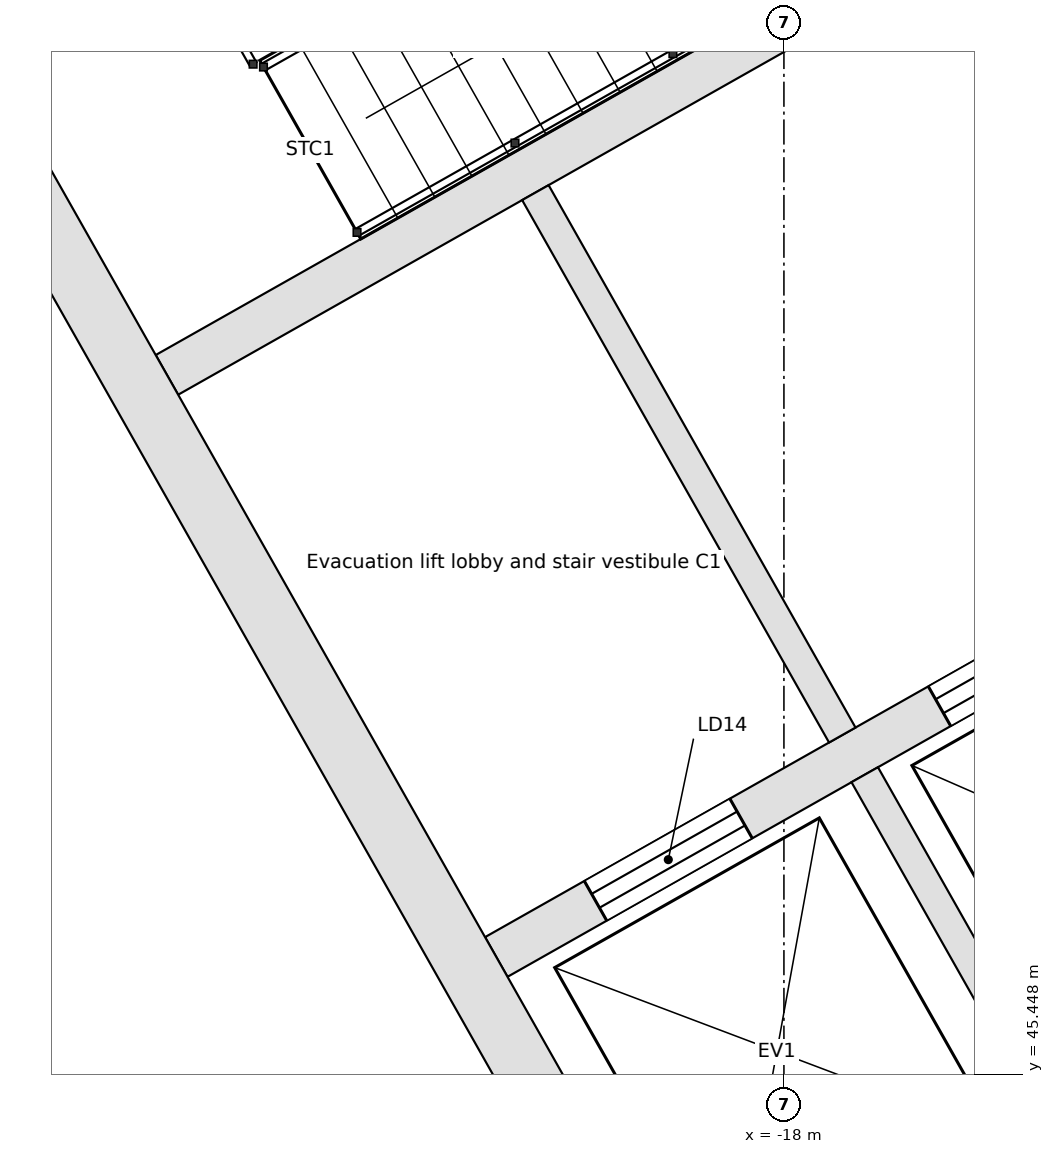
"""IFC4 building model, lengths in metres.
Left out: names, types, materials, properties, quantities, classifications, styles, units other than length and angle.
Written with IfcOpenShell. Run it as: python <this file> out.ifc"""

import sys

from ifc_helpers import new_model, si_unit, direction, frame, frame_2d, origin, place, context, subcontext, project, spatial, rectangle, extrude, element, fill, save


model = new_model("IFC4")
c1 = context("Model", 3, precision=1e-05, world=origin(), true_north=direction((0.0, 1.0)))
c2 = subcontext(c1, "Body", "Model", "MODEL_VIEW")
j1 = project(units=[si_unit("LENGTHUNIT", "METRE"), si_unit("PLANEANGLEUNIT", "RADIAN")], contexts=[c1])
p1 = place(None, origin())
s1 = spatial("IfcSite", under=j1, at=p1, CompositionType="ELEMENT")
p2 = place(p1, origin())
s2 = spatial("IfcBuilding", under=s1, at=p2, CompositionType="ELEMENT")
p3 = place(p2, frame((0.0, 0.0, 277.9)))
s3 = spatial("IfcBuildingStorey", under=s2, at=p3, CompositionType="ELEMENT", Elevation=277.9)
p4 = place(p3, frame((-58.732, 38.771, 0.0), z_axis=(0.0, 0.0, 1.0), x_axis=(0.870355615581, 0.492423702137, 0.0)))
e1 = element("IfcWall", 1, at=p4, inside=s3, PredefinedType="STANDARD", context=c2, shape_type="SweptSolid", body=[
    extrude(rectangle(XDim=64.052, YDim=0.25, at=frame_2d((32.026, 0.0))), origin(), (0.0, 0.0, 1.0), 3.52),
])
p5 = place(p4, frame((61.259, 0.0, 0.8)))
e2 = element("IfcOpeningElement", 2, at=p5, cuts=e1, PredefinedType="OPENING", context=c2, shape_type="SweptSolid", body=[
    extrude(rectangle(XDim=2.4, YDim=2.2, at=frame_2d((1.2, 1.1))), frame((0.0, 0.135, 0.0), z_axis=(0.0, -1.0, 0.0), x_axis=(1.0, 0.0, 0.0)), (0.0, 0.0, 1.0), 0.27),
])
p6 = place(p4, frame((58.216, 0.0, 0.8)))
e3 = element("IfcOpeningElement", 3, at=p6, cuts=e1, PredefinedType="OPENING", context=c2, shape_type="SweptSolid", body=[
    extrude(rectangle(XDim=2.4, YDim=2.2, at=frame_2d((1.2, 1.1))), frame((0.0, 0.135, 0.0), z_axis=(0.0, -1.0, 0.0), x_axis=(1.0, 0.0, 0.0)), (0.0, 0.0, 1.0), 0.27),
])
p7 = place(p4, frame((55.173, 0.0, 0.8)))
e4 = element("IfcOpeningElement", 4, at=p7, cuts=e1, PredefinedType="OPENING", context=c2, shape_type="SweptSolid", body=[
    extrude(rectangle(XDim=2.4, YDim=2.2, at=frame_2d((1.2, 1.1))), frame((0.0, 0.135, 0.0), z_axis=(0.0, -1.0, 0.0), x_axis=(1.0, 0.0, 0.0)), (0.0, 0.0, 1.0), 0.27),
])
p8 = place(p4, frame((52.129, 0.0, 0.8)))
e5 = element("IfcOpeningElement", 5, at=p8, cuts=e1, PredefinedType="OPENING", context=c2, shape_type="SweptSolid", body=[
    extrude(rectangle(XDim=2.4, YDim=2.2, at=frame_2d((1.2, 1.1))), frame((0.0, 0.135, 0.0), z_axis=(0.0, -1.0, 0.0), x_axis=(1.0, 0.0, 0.0)), (0.0, 0.0, 1.0), 0.27),
])
p9 = place(p4, frame((49.086, 0.0, 0.8)))
e6 = element("IfcOpeningElement", 6, at=p9, cuts=e1, PredefinedType="OPENING", context=c2, shape_type="SweptSolid", body=[
    extrude(rectangle(XDim=2.4, YDim=2.2, at=frame_2d((1.2, 1.1))), frame((0.0, 0.135, 0.0), z_axis=(0.0, -1.0, 0.0), x_axis=(1.0, 0.0, 0.0)), (0.0, 0.0, 1.0), 0.27),
])
p10 = place(p4, frame((46.043, 0.0, 0.8)))
e7 = element("IfcOpeningElement", 7, at=p10, cuts=e1, PredefinedType="OPENING", context=c2, shape_type="SweptSolid", body=[
    extrude(rectangle(XDim=2.4, YDim=2.2, at=frame_2d((1.2, 1.1))), frame((0.0, 0.135, 0.0), z_axis=(0.0, -1.0, 0.0), x_axis=(1.0, 0.0, 0.0)), (0.0, 0.0, 1.0), 0.27),
])
p11 = place(p4, frame((43.0, 0.0, 0.8)))
e8 = element("IfcOpeningElement", 8, at=p11, cuts=e1, PredefinedType="OPENING", context=c2, shape_type="SweptSolid", body=[
    extrude(rectangle(XDim=2.4, YDim=2.2, at=frame_2d((1.2, 1.1))), frame((0.0, 0.135, 0.0), z_axis=(0.0, -1.0, 0.0), x_axis=(1.0, 0.0, 0.0)), (0.0, 0.0, 1.0), 0.27),
])
p12 = place(p4, frame((39.956, 0.0, 0.8)))
e9 = element("IfcOpeningElement", 9, at=p12, cuts=e1, PredefinedType="OPENING", context=c2, shape_type="SweptSolid", body=[
    extrude(rectangle(XDim=2.4, YDim=2.2, at=frame_2d((1.2, 1.1))), frame((0.0, 0.135, 0.0), z_axis=(0.0, -1.0, 0.0), x_axis=(1.0, 0.0, 0.0)), (0.0, 0.0, 1.0), 0.27),
])
p13 = place(p4, frame((36.913, 0.0, 0.8)))
e10 = element("IfcOpeningElement", 10, at=p13, cuts=e1, PredefinedType="OPENING", context=c2, shape_type="SweptSolid", body=[
    extrude(rectangle(XDim=2.4, YDim=2.2, at=frame_2d((1.2, 1.1))), frame((0.0, 0.135, 0.0), z_axis=(0.0, -1.0, 0.0), x_axis=(1.0, 0.0, 0.0)), (0.0, 0.0, 1.0), 0.27),
])
p14 = place(p4, frame((33.87, 0.0, 0.8)))
e11 = element("IfcOpeningElement", 11, at=p14, cuts=e1, PredefinedType="OPENING", context=c2, shape_type="SweptSolid", body=[
    extrude(rectangle(XDim=2.4, YDim=2.2, at=frame_2d((1.2, 1.1))), frame((0.0, 0.135, 0.0), z_axis=(0.0, -1.0, 0.0), x_axis=(1.0, 0.0, 0.0)), (0.0, 0.0, 1.0), 0.27),
])
p15 = place(p4, frame((30.826, 0.0, 0.8)))
e12 = element("IfcOpeningElement", 12, at=p15, cuts=e1, PredefinedType="OPENING", context=c2, shape_type="SweptSolid", body=[
    extrude(rectangle(XDim=2.4, YDim=2.2, at=frame_2d((1.2, 1.1))), frame((0.0, 0.135, 0.0), z_axis=(0.0, -1.0, 0.0), x_axis=(1.0, 0.0, 0.0)), (0.0, 0.0, 1.0), 0.27),
])
p16 = place(p4, frame((27.783, 0.0, 0.8)))
e13 = element("IfcOpeningElement", 13, at=p16, cuts=e1, PredefinedType="OPENING", context=c2, shape_type="SweptSolid", body=[
    extrude(rectangle(XDim=2.4, YDim=2.2, at=frame_2d((1.2, 1.1))), frame((0.0, 0.135, 0.0), z_axis=(0.0, -1.0, 0.0), x_axis=(1.0, 0.0, 0.0)), (0.0, 0.0, 1.0), 0.27),
])
p17 = place(p4, frame((24.74, 0.0, 0.8)))
e14 = element("IfcOpeningElement", 14, at=p17, cuts=e1, PredefinedType="OPENING", context=c2, shape_type="SweptSolid", body=[
    extrude(rectangle(XDim=2.4, YDim=2.2, at=frame_2d((1.2, 1.1))), frame((0.0, 0.135, 0.0), z_axis=(0.0, -1.0, 0.0), x_axis=(1.0, 0.0, 0.0)), (0.0, 0.0, 1.0), 0.27),
])
p18 = place(p4, frame((21.696, 0.0, 0.8)))
e15 = element("IfcOpeningElement", 15, at=p18, cuts=e1, PredefinedType="OPENING", context=c2, shape_type="SweptSolid", body=[
    extrude(rectangle(XDim=2.4, YDim=2.2, at=frame_2d((1.2, 1.1))), frame((0.0, 0.135, 0.0), z_axis=(0.0, -1.0, 0.0), x_axis=(1.0, 0.0, 0.0)), (0.0, 0.0, 1.0), 0.27),
])
p19 = place(p4, frame((18.653, 0.0, 0.8)))
e16 = element("IfcOpeningElement", 16, at=p19, cuts=e1, PredefinedType="OPENING", context=c2, shape_type="SweptSolid", body=[
    extrude(rectangle(XDim=2.4, YDim=2.2, at=frame_2d((1.2, 1.1))), frame((0.0, 0.135, 0.0), z_axis=(0.0, -1.0, 0.0), x_axis=(1.0, 0.0, 0.0)), (0.0, 0.0, 1.0), 0.27),
])
p20 = place(p4, frame((15.61, 0.0, 0.8)))
e17 = element("IfcOpeningElement", 17, at=p20, cuts=e1, PredefinedType="OPENING", context=c2, shape_type="SweptSolid", body=[
    extrude(rectangle(XDim=2.4, YDim=2.2, at=frame_2d((1.2, 1.1))), frame((0.0, 0.135, 0.0), z_axis=(0.0, -1.0, 0.0), x_axis=(1.0, 0.0, 0.0)), (0.0, 0.0, 1.0), 0.27),
])
p21 = place(p4, frame((12.567, 0.0, 0.8)))
e18 = element("IfcOpeningElement", 18, at=p21, cuts=e1, PredefinedType="OPENING", context=c2, shape_type="SweptSolid", body=[
    extrude(rectangle(XDim=2.4, YDim=2.2, at=frame_2d((1.2, 1.1))), frame((0.0, 0.135, 0.0), z_axis=(0.0, -1.0, 0.0), x_axis=(1.0, 0.0, 0.0)), (0.0, 0.0, 1.0), 0.27),
])
p22 = place(p4, frame((9.523, 0.0, 0.8)))
e19 = element("IfcOpeningElement", 19, at=p22, cuts=e1, PredefinedType="OPENING", context=c2, shape_type="SweptSolid", body=[
    extrude(rectangle(XDim=2.4, YDim=2.2, at=frame_2d((1.2, 1.1))), frame((0.0, 0.135, 0.0), z_axis=(0.0, -1.0, 0.0), x_axis=(1.0, 0.0, 0.0)), (0.0, 0.0, 1.0), 0.27),
])
p23 = place(p4, frame((6.48, 0.0, 0.8)))
e20 = element("IfcOpeningElement", 20, at=p23, cuts=e1, PredefinedType="OPENING", context=c2, shape_type="SweptSolid", body=[
    extrude(rectangle(XDim=2.4, YDim=2.2, at=frame_2d((1.2, 1.1))), frame((0.0, 0.135, 0.0), z_axis=(0.0, -1.0, 0.0), x_axis=(1.0, 0.0, 0.0)), (0.0, 0.0, 1.0), 0.27),
])
p24 = place(p4, frame((3.437, 0.0, 0.8)))
e21 = element("IfcOpeningElement", 21, at=p24, cuts=e1, PredefinedType="OPENING", context=c2, shape_type="SweptSolid", body=[
    extrude(rectangle(XDim=2.4, YDim=2.2, at=frame_2d((1.2, 1.1))), frame((0.0, 0.135, 0.0), z_axis=(0.0, -1.0, 0.0), x_axis=(1.0, 0.0, 0.0)), (0.0, 0.0, 1.0), 0.27),
])
p25 = place(p4, frame((0.393, 0.0, 0.8)))
e22 = element("IfcOpeningElement", 22, at=p25, cuts=e1, PredefinedType="OPENING", context=c2, shape_type="SweptSolid", body=[
    extrude(rectangle(XDim=2.4, YDim=2.2, at=frame_2d((1.2, 1.1))), frame((0.0, 0.135, 0.0), z_axis=(0.0, -1.0, 0.0), x_axis=(1.0, 0.0, 0.0)), (0.0, 0.0, 1.0), 0.27),
])
p26 = place(p3, frame((-3.017, 46.293, 0.0), z_axis=(0.0, 0.0, 1.0), x_axis=(-0.870355474887, -0.492423950812, 0.0)))
e23 = element("IfcWall", 23, at=p26, inside=s3, PredefinedType="STANDARD", context=c2, shape_type="SweptSolid", body=[
    extrude(rectangle(XDim=40.34, YDim=0.25, at=frame_2d((20.17, 0.0))), origin(), (0.0, 0.0, 1.0), 3.52),
])
p27 = place(p26, frame((37.428, 0.0, 0.8)))
e24 = element("IfcOpeningElement", 24, at=p27, cuts=e23, PredefinedType="OPENING", context=c2, shape_type="SweptSolid", body=[
    extrude(rectangle(XDim=2.4, YDim=2.2, at=frame_2d((1.2, 1.1))), frame((0.0, 0.135, 0.0), z_axis=(0.0, -1.0, 0.0), x_axis=(1.0, 0.0, 0.0)), (0.0, 0.0, 1.0), 0.27),
])
p28 = place(p26, frame((34.372, 0.0, 0.0)))
e25 = element("IfcOpeningElement", 25, at=p28, cuts=e23, PredefinedType="OPENING", context=c2, shape_type="SweptSolid", body=[
    extrude(rectangle(XDim=1.8, YDim=2.4, at=frame_2d((0.9, 1.2))), frame((0.0, 0.135, 0.0), z_axis=(0.0, -1.0, 0.0), x_axis=(1.0, 0.0, 0.0)), (0.0, 0.0, 1.0), 0.27),
])
p29 = place(p26, frame((30.716, 0.0, 0.8)))
e26 = element("IfcOpeningElement", 26, at=p29, cuts=e23, PredefinedType="OPENING", context=c2, shape_type="SweptSolid", body=[
    extrude(rectangle(XDim=2.4, YDim=2.2, at=frame_2d((1.2, 1.1))), frame((0.0, 0.135, 0.0), z_axis=(0.0, -1.0, 0.0), x_axis=(1.0, 0.0, 0.0)), (0.0, 0.0, 1.0), 0.27),
])
p30 = place(p26, frame((27.36, 0.0, 0.8)))
e27 = element("IfcOpeningElement", 27, at=p30, cuts=e23, PredefinedType="OPENING", context=c2, shape_type="SweptSolid", body=[
    extrude(rectangle(XDim=2.4, YDim=2.2, at=frame_2d((1.2, 1.1))), frame((0.0, 0.135, 0.0), z_axis=(0.0, -1.0, 0.0), x_axis=(1.0, 0.0, 0.0)), (0.0, 0.0, 1.0), 0.27),
])
p31 = place(p26, frame((24.304, 0.0, 0.0)))
e28 = element("IfcOpeningElement", 28, at=p31, cuts=e23, PredefinedType="OPENING", context=c2, shape_type="SweptSolid", body=[
    extrude(rectangle(XDim=1.8, YDim=2.4, at=frame_2d((0.9, 1.2))), frame((0.0, 0.135, 0.0), z_axis=(0.0, -1.0, 0.0), x_axis=(1.0, 0.0, 0.0)), (0.0, 0.0, 1.0), 0.27),
])
p32 = place(p26, frame((20.648, 0.0, 0.8)))
e29 = element("IfcOpeningElement", 29, at=p32, cuts=e23, PredefinedType="OPENING", context=c2, shape_type="SweptSolid", body=[
    extrude(rectangle(XDim=2.4, YDim=2.2, at=frame_2d((1.2, 1.1))), frame((0.0, 0.135, 0.0), z_axis=(0.0, -1.0, 0.0), x_axis=(1.0, 0.0, 0.0)), (0.0, 0.0, 1.0), 0.27),
])
p33 = place(p26, frame((17.292, 0.0, 0.8)))
e30 = element("IfcOpeningElement", 30, at=p33, cuts=e23, PredefinedType="OPENING", context=c2, shape_type="SweptSolid", body=[
    extrude(rectangle(XDim=2.4, YDim=2.2, at=frame_2d((1.2, 1.1))), frame((0.0, 0.135, 0.0), z_axis=(0.0, -1.0, 0.0), x_axis=(1.0, 0.0, 0.0)), (0.0, 0.0, 1.0), 0.27),
])
p34 = place(p26, frame((14.236, 0.0, 0.0)))
e31 = element("IfcOpeningElement", 31, at=p34, cuts=e23, PredefinedType="OPENING", context=c2, shape_type="SweptSolid", body=[
    extrude(rectangle(XDim=1.8, YDim=2.4, at=frame_2d((0.9, 1.2))), frame((0.0, 0.135, 0.0), z_axis=(0.0, -1.0, 0.0), x_axis=(1.0, 0.0, 0.0)), (0.0, 0.0, 1.0), 0.27),
])
p35 = place(p26, frame((10.58, 0.0, 0.8)))
e32 = element("IfcOpeningElement", 32, at=p35, cuts=e23, PredefinedType="OPENING", context=c2, shape_type="SweptSolid", body=[
    extrude(rectangle(XDim=2.4, YDim=2.2, at=frame_2d((1.2, 1.1))), frame((0.0, 0.135, 0.0), z_axis=(0.0, -1.0, 0.0), x_axis=(1.0, 0.0, 0.0)), (0.0, 0.0, 1.0), 0.27),
])
p36 = place(p26, frame((7.224, 0.0, 0.8)))
e33 = element("IfcOpeningElement", 33, at=p36, cuts=e23, PredefinedType="OPENING", context=c2, shape_type="SweptSolid", body=[
    extrude(rectangle(XDim=2.4, YDim=2.2, at=frame_2d((1.2, 1.1))), frame((0.0, 0.135, 0.0), z_axis=(0.0, -1.0, 0.0), x_axis=(1.0, 0.0, 0.0)), (0.0, 0.0, 1.0), 0.27),
])
p37 = place(p26, frame((4.168, 0.0, 0.0)))
e34 = element("IfcOpeningElement", 34, at=p37, cuts=e23, PredefinedType="OPENING", context=c2, shape_type="SweptSolid", body=[
    extrude(rectangle(XDim=1.8, YDim=2.4, at=frame_2d((0.9, 1.2))), frame((0.0, 0.135, 0.0), z_axis=(0.0, -1.0, 0.0), x_axis=(1.0, 0.0, 0.0)), (0.0, 0.0, 1.0), 0.27),
])
p38 = place(p26, frame((0.512, 0.0, 0.8)))
e35 = element("IfcOpeningElement", 35, at=p38, cuts=e23, PredefinedType="OPENING", context=c2, shape_type="SweptSolid", body=[
    extrude(rectangle(XDim=2.4, YDim=2.2, at=frame_2d((1.2, 1.1))), frame((0.0, 0.135, 0.0), z_axis=(0.0, -1.0, 0.0), x_axis=(1.0, 0.0, 0.0)), (0.0, 0.0, 1.0), 0.27),
])
p39 = place(p3, frame((-17.975, 42.017, 0.0), z_axis=(0.0, 0.0, 1.0), x_axis=(0.87034965173, 0.492434243055, 0.0)))
e36 = element("IfcWall", 36, at=p39, inside=s3, PredefinedType="SOLIDWALL", context=c2, shape_type="SweptSolid", body=[
    extrude(rectangle(XDim=15.0, YDim=0.4, at=frame_2d((7.5, 0.0))), origin(), (0.0, 0.0, 1.0), 3.52),
])
p40 = place(p39, frame((6.1, 0.0, 0.0)))
e37 = element("IfcOpeningElement", 37, at=p40, cuts=e36, PredefinedType="OPENING", context=c2, shape_type="SweptSolid", body=[
    extrude(rectangle(XDim=1.2, YDim=2.1, at=frame_2d((0.6, 1.05))), frame((0.0, 0.21, 0.0), z_axis=(0.0, -1.0, 0.0), x_axis=(1.0, 0.0, 0.0)), (0.0, 0.0, 1.0), 0.42),
])
p41 = place(p3, frame((-19.892, 46.218, 0.0), z_axis=(0.0, 0.0, 1.0), x_axis=(0.870341639186, 0.492448404505, 0.0)))
e38 = element("IfcWall", 38, at=p41, inside=s3, PredefinedType="SOLIDWALL", context=c2, shape_type="SweptSolid", body=[
    extrude(rectangle(XDim=5.1, YDim=0.3, at=frame_2d((2.55, 0.0))), origin(), (0.0, 0.0, 1.0), 3.52),
])
p42 = place(p41, frame((0.75, 0.0, 0.0)))
e39 = element("IfcOpeningElement", 39, at=p42, cuts=e38, PredefinedType="OPENING", context=c2, shape_type="SweptSolid", body=[
    extrude(rectangle(XDim=1.1, YDim=2.1, at=frame_2d((0.55, 1.05))), frame((0.0, 0.16, 0.0), z_axis=(0.0, -1.0, 0.0), x_axis=(1.0, 0.0, 0.0)), (0.0, 0.0, 1.0), 0.32),
])
p43 = place(p41, frame((3.35, 0.0, 0.0)))
e40 = element("IfcOpeningElement", 40, at=p43, cuts=e38, PredefinedType="OPENING", context=c2, shape_type="SweptSolid", body=[
    extrude(rectangle(XDim=1.1, YDim=2.1, at=frame_2d((0.55, 1.05))), frame((0.0, 0.16, 0.0), z_axis=(0.0, -1.0, 0.0), x_axis=(1.0, 0.0, 0.0)), (0.0, 0.0, 1.0), 0.32),
])
p44 = place(p3, frame((-22.059, 50.047, 0.0), z_axis=(0.0, 0.0, 1.0), x_axis=(0.87035077051, 0.49243226567, 0.0)))
e41 = element("IfcWall", 41, at=p44, inside=s3, PredefinedType="SOLIDWALL", context=c2, shape_type="SweptSolid", body=[
    extrude(rectangle(XDim=7.4, YDim=0.3, at=frame_2d((3.7, 0.0))), origin(), (0.0, 0.0, 1.0), 3.52),
])
p45 = place(p44, frame((0.4, 0.0, 0.0)))
e42 = element("IfcOpeningElement", 42, at=p45, cuts=e41, PredefinedType="OPENING", context=c2, shape_type="SweptSolid", body=[
    extrude(rectangle(XDim=1.0, YDim=2.1, at=frame_2d((0.5, 1.05))), frame((0.0, 0.16, 0.0), z_axis=(0.0, -1.0, 0.0), x_axis=(1.0, 0.0, 0.0)), (0.0, 0.0, 1.0), 0.32),
])
p46 = place(p3, frame((-24.4, 53.779, 0.0), z_axis=(0.0, 0.0, 1.0), x_axis=(0.492421663121, -0.870356769198, 0.0)))
e43 = element("IfcWall", 43, at=p46, inside=s3, PredefinedType="SOLIDWALL", context=c2, shape_type="SweptSolid", body=[
    extrude(rectangle(XDim=13.2, YDim=0.4, at=frame_2d((6.6, 0.0))), origin(), (0.0, 0.0, 1.0), 3.52),
])
p47 = place(p3, frame((-17.469, 47.417, 0.0), z_axis=(0.0, 0.0, 1.0), x_axis=(0.492466057713, -0.870331650579, 0.0)))
e44 = element("IfcWall", 44, at=p47, inside=s3, PredefinedType="SOLIDWALL", context=c2, shape_type="SweptSolid", body=[
    extrude(rectangle(XDim=4.25, YDim=0.2, at=frame_2d((2.125, 0.0))), origin(), (0.0, 0.0, 1.0), 3.52),
])
p48 = place(p3, frame((-19.635, 51.246, 0.0), z_axis=(0.0, 0.0, 1.0), x_axis=(0.492408451753, -0.87036424366, 0.0)))
e45 = element("IfcWall", 45, at=p48, inside=s3, PredefinedType="PARTITIONING", context=c2, shape_type="SweptSolid", body=[
    extrude(rectangle(XDim=4.1, YDim=0.2, at=frame_2d((2.05, 0.0))), origin(), (0.0, 0.0, 1.0), 3.52),
])
p49 = place(p48, frame((1.55, 0.0, 0.0)))
e46 = element("IfcOpeningElement", 46, at=p49, cuts=e45, PredefinedType="OPENING", context=c2, shape_type="SweptSolid", body=[
    extrude(rectangle(XDim=1.0, YDim=2.1, at=frame_2d((0.5, 1.05))), frame((0.0, 0.11, 0.0), z_axis=(0.0, -1.0, 0.0), x_axis=(1.0, 0.0, 0.0)), (0.0, 0.0, 1.0), 0.22),
])
p50 = place(p3, frame((-27.827, 46.554, 0.0), z_axis=(0.0, 0.0, 1.0), x_axis=(0.870339695563, 0.492451839602, 0.0)))
e47 = element("IfcWall", 47, at=p50, inside=s3, PredefinedType="PARTITIONING", context=c2, shape_type="SweptSolid", body=[
    extrude(rectangle(XDim=6.34, YDim=0.15, at=frame_2d((3.17, 0.0))), origin(), (0.0, 0.0, 1.0), 2.792),
])
p51 = place(p3, frame((-26.842, 44.813, 0.0), z_axis=(0.0, 0.0, 1.0), x_axis=(0.870283015025, 0.492552001071, 0.0)))
e48 = element("IfcWall", 48, at=p51, inside=s3, PredefinedType="PARTITIONING", context=c2, shape_type="SweptSolid", body=[
    extrude(rectangle(XDim=6.341, YDim=0.125, at=frame_2d((3.17, 0.0))), origin(), (0.0, 0.0, 1.0), 2.792),
])
p52 = place(p42, origin())
e49 = element("IfcDoor", 49, at=p52, inside=s3, OperationType="DOUBLE_DOOR_SLIDING", PredefinedType="DOOR", context=c2, shape_type="SweptSolid", body=[
    extrude(rectangle(XDim=1.1, YDim=2.1, at=frame_2d((0.55, 1.05))), frame((0.0, 0.025, 0.0), z_axis=(0.0, -1.0, 0.0), x_axis=(1.0, 0.0, 0.0)), (0.0, 0.0, 1.0), 0.05),
])
fill(e39, e49)
p53 = place(p43, origin())
e50 = element("IfcDoor", 50, at=p53, inside=s3, OperationType="DOUBLE_DOOR_SLIDING", PredefinedType="DOOR", context=c2, shape_type="SweptSolid", body=[
    extrude(rectangle(XDim=1.1, YDim=2.1, at=frame_2d((0.55, 1.05))), frame((0.0, 0.025, 0.0), z_axis=(0.0, -1.0, 0.0), x_axis=(1.0, 0.0, 0.0)), (0.0, 0.0, 1.0), 0.05),
])
fill(e40, e50)
p54 = place(p45, origin())
e51 = element("IfcDoor", 51, at=p54, inside=s3, OperationType="SINGLE_SWING_LEFT", PredefinedType="DOOR", context=c2, shape_type="SweptSolid", body=[
    extrude(rectangle(XDim=1.0, YDim=2.1, at=frame_2d((0.5, 1.05))), frame((0.0, 0.025, 0.0), z_axis=(0.0, -1.0, 0.0), x_axis=(1.0, 0.0, 0.0)), (0.0, 0.0, 1.0), 0.05),
])
fill(e42, e51)
p55 = place(p49, frame((1.0, 0.0, 0.0), z_axis=(0.0, 0.0, 1.0), x_axis=(-1.0, 0.0, 0.0)))
e52 = element("IfcDoor", 52, at=p55, inside=s3, OperationType="SINGLE_SWING_RIGHT", PredefinedType="DOOR", context=c2, shape_type="SweptSolid", body=[
    extrude(rectangle(XDim=1.0, YDim=2.1, at=frame_2d((0.5, 1.05))), frame((0.0, 0.025, 0.0), z_axis=(0.0, -1.0, 0.0), x_axis=(1.0, 0.0, 0.0)), (0.0, 0.0, 1.0), 0.05),
])
fill(e46, e52)
save(model, sys.argv[1])
